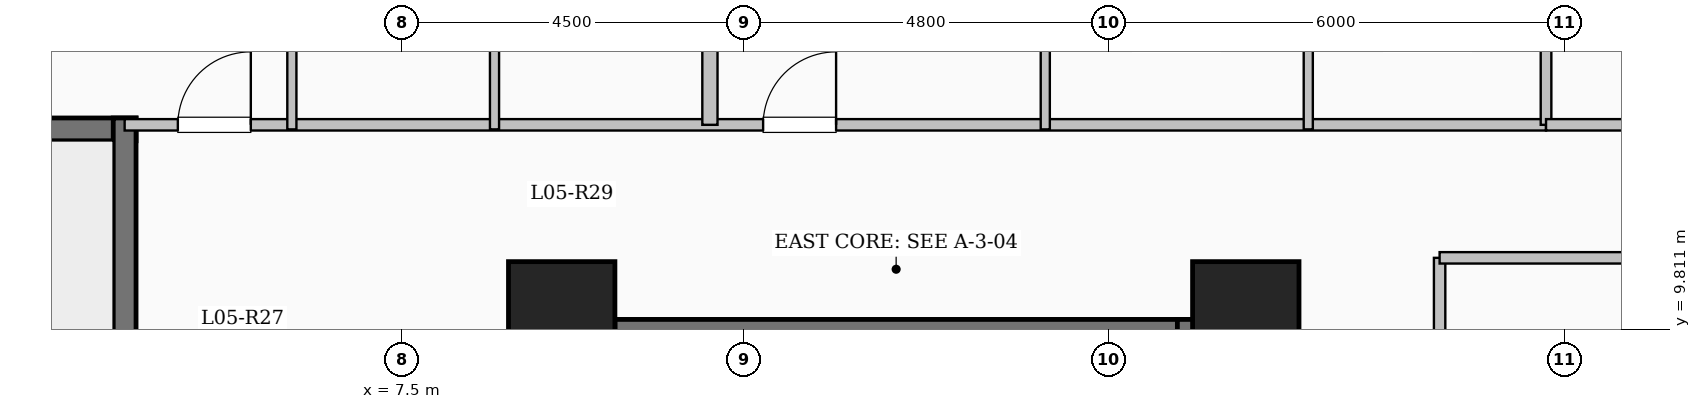
"""IFC4 building model, lengths in metres.
Left out: names, types, materials, properties, quantities, classifications, styles, units other than length and angle.
Written with IfcOpenShell. Run it as: python <this file> out.ifc"""

import sys

from ifc_helpers import new_model, si_unit, direction, frame, frame_2d, origin, origin_2d, place, context, subcontext, project, spatial, rectangle, extrude, element, fill, save


model = new_model("IFC4")
c1 = context("Model", 3, precision=1e-05, world=origin(), true_north=direction((0.0, 1.0)))
c2 = subcontext(c1, "Body", "Model", "MODEL_VIEW")
j1 = project(units=[si_unit("LENGTHUNIT", "METRE"), si_unit("PLANEANGLEUNIT", "RADIAN")], contexts=[c1])
p1 = place(None, origin())
s1 = spatial("IfcSite", under=j1, at=p1, CompositionType="ELEMENT")
p2 = place(p1, origin())
s2 = spatial("IfcBuilding", under=s1, at=p2, CompositionType="ELEMENT")
p3 = place(p2, frame((0.0, 0.0, 24.0)))
s3 = spatial("IfcBuildingStorey", under=s2, at=p3, CompositionType="ELEMENT", Elevation=24.0)
for number, where, z_axis, x_axis in (
    (1, (9.6, 10.0, 0.0), (0.0, 0.0, 1.0), (1.0, 0.0, 0.0)),
    (2, (18.6, 10.0, 0.0), (0.0, 0.0, 1.0), (1.0, 0.0, 0.0)),
):
    element("IfcColumn", number, at=place(p3, frame(where, z_axis=z_axis, x_axis=x_axis)), inside=s3, PredefinedType="COLUMN", context=c2, shape_type="SweptSolid", body=[
        extrude(rectangle(XDim=1.4, YDim=1.4, at=origin_2d()), origin(), (0.0, 0.0, 1.0), 3.35),
    ])
p4 = place(p3, frame((10.0, 9.79, 0.0), z_axis=(0.0, 0.0, 1.0), x_axis=(1.0, 0.0, 0.0)))
e3 = element("IfcWall", 3, at=p4, inside=s3, PredefinedType="SHEAR", context=c2, shape_type="SweptSolid", body=[
    extrude(rectangle(XDim=8.0, YDim=0.3, at=frame_2d((4.0, 0.0))), origin(), (0.0, 0.0, 1.0), 3.35),
])
for number, where, z_axis, x_axis in (
    (4, (10.15, 6.35, 0.0), (0.0, 0.0, 1.0), (0.0, 1.0, 0.0)),
    (5, (17.85, 6.35, 0.0), (0.0, 0.0, 1.0), (0.0, 1.0, 0.0)),
):
    element("IfcWall", number, at=place(p3, frame(where, z_axis=z_axis, x_axis=x_axis)), inside=s3, PredefinedType="SHEAR", context=c2, shape_type="SweptSolid", body=[
        extrude(rectangle(XDim=3.59, YDim=0.3, at=frame_2d((1.795, 0.0))), origin(), (0.0, 0.0, 1.0), 3.35),
    ])
p5 = place(p3, frame((-4.0, 12.44, 0.0), z_axis=(0.0, 0.0, 1.0), x_axis=(1.0, 0.0, 0.0)))
e6 = element("IfcWall", 6, at=p5, inside=s3, PredefinedType="SHEAR", context=c2, shape_type="SweptSolid", body=[
    extrude(rectangle(XDim=8.0, YDim=0.3, at=frame_2d((4.0, 0.0))), origin(), (0.0, 0.0, 1.0), 3.35),
])
p6 = place(p3, frame((3.85, 9.0, 0.0), z_axis=(0.0, 0.0, 1.0), x_axis=(0.0, 1.0, 0.0)))
e7 = element("IfcWall", 7, at=p6, inside=s3, PredefinedType="SHEAR", context=c2, shape_type="SweptSolid", body=[
    extrude(rectangle(XDim=3.59, YDim=0.3, at=frame_2d((1.795, 0.0))), origin(), (0.0, 0.0, 1.0), 3.35),
])
p7 = place(p3, frame((3.85, 12.5, 0.0), z_axis=(0.0, 0.0, 1.0), x_axis=(1.0, 0.0, 0.0)))
e8 = element("IfcWall", 8, at=p7, inside=s3, PredefinedType="PARTITIONING", context=c2, shape_type="SweptSolid", body=[
    extrude(rectangle(XDim=18.7, YDim=0.15, at=frame_2d((9.35, 0.0))), origin(), (0.0, 0.0, 1.0), 3.1),
])
p8 = place(p7, frame((0.7, 0.0, 0.0)))
e9 = element("IfcOpeningElement", 9, at=p8, cuts=e8, PredefinedType="OPENING", context=c2, shape_type="SweptSolid", body=[
    extrude(rectangle(XDim=0.96, YDim=2.15, at=frame_2d((0.48, 1.075))), frame((0.0, 0.085, 0.0), z_axis=(0.0, -1.0, 0.0), x_axis=(1.0, 0.0, 0.0)), (0.0, 0.0, 1.0), 0.17),
])
p9 = place(p7, frame((8.4, 0.0, 0.0)))
e10 = element("IfcOpeningElement", 10, at=p9, cuts=e8, PredefinedType="OPENING", context=c2, shape_type="SweptSolid", body=[
    extrude(rectangle(XDim=0.96, YDim=2.15, at=frame_2d((0.48, 1.075))), frame((0.0, 0.085, 0.0), z_axis=(0.0, -1.0, 0.0), x_axis=(1.0, 0.0, 0.0)), (0.0, 0.0, 1.0), 0.17),
])
p10 = place(p3, frame((21.15, -7.25, 0.0), z_axis=(0.0, 0.0, 1.0), x_axis=(0.0, 1.0, 0.0)))
e11 = element("IfcWall", 11, at=p10, inside=s3, PredefinedType="PARTITIONING", context=c2, shape_type="SweptSolid", body=[
    extrude(rectangle(XDim=18.0, YDim=0.15, at=frame_2d((9.0, 0.0))), origin(), (0.0, 0.0, 1.0), 2.585),
])
p11 = place(p3, frame((11.55, 12.5, 0.0), z_axis=(0.0, 0.0, 1.0), x_axis=(0.0, 1.0, 0.0)))
e12 = element("IfcWall", 12, at=p11, inside=s3, PredefinedType="SOLIDWALL", context=c2, shape_type="SweptSolid", body=[
    extrude(rectangle(XDim=11.1, YDim=0.2, at=frame_2d((5.55, 0.0))), origin(), (0.0, 0.0, 1.0), 3.1),
])
p12 = place(p3, frame((6.05, 12.44, 0.0), z_axis=(0.0, 0.0, 1.0), x_axis=(0.0, 1.0, 0.0)))
e13 = element("IfcWall", 13, at=p12, inside=s3, PredefinedType="PARTITIONING", context=c2, shape_type="SweptSolid", body=[
    extrude(rectangle(XDim=12.381, YDim=0.12, at=frame_2d((6.19, 0.0))), origin(), (0.0, 0.0, 1.0), 3.1),
])
p13 = place(p12, frame((3.245, 0.0, 0.0)))
e14 = element("IfcOpeningElement", 14, at=p13, cuts=e13, PredefinedType="OPENING", context=c2, shape_type="SweptSolid", body=[
    extrude(rectangle(XDim=1.08, YDim=2.15, at=frame_2d((0.54, 1.075))), frame((0.0, 0.07, 0.0), z_axis=(0.0, -1.0, 0.0), x_axis=(1.0, 0.0, 0.0)), (0.0, 0.0, 1.0), 0.14),
])
p14 = place(p3, frame((8.716, 12.44, 0.0), z_axis=(0.0, 0.0, 1.0), x_axis=(0.0, 1.0, 0.0)))
e15 = element("IfcWall", 15, at=p14, inside=s3, PredefinedType="PARTITIONING", context=c2, shape_type="SweptSolid", body=[
    extrude(rectangle(XDim=2.96, YDim=0.12, at=frame_2d((1.48, 0.0))), origin(), (0.0, 0.0, 1.0), 3.1),
])
p15 = place(p3, frame((15.962, 12.44, 0.0), z_axis=(0.0, 0.0, 1.0), x_axis=(0.0, 1.0, 0.0)))
e16 = element("IfcWall", 16, at=p15, inside=s3, PredefinedType="PARTITIONING", context=c2, shape_type="SweptSolid", body=[
    extrude(rectangle(XDim=11.16, YDim=0.12, at=frame_2d((5.58, 0.0))), origin(), (0.0, 0.0, 1.0), 3.1),
])
p16 = place(p15, frame((2.735, 0.0, 0.0)))
e17 = element("IfcOpeningElement", 17, at=p16, cuts=e16, PredefinedType="OPENING", context=c2, shape_type="SweptSolid", body=[
    extrude(rectangle(XDim=1.08, YDim=2.15, at=frame_2d((0.54, 1.075))), frame((0.0, 0.07, 0.0), z_axis=(0.0, -1.0, 0.0), x_axis=(1.0, 0.0, 0.0)), (0.0, 0.0, 1.0), 0.14),
])
p17 = place(p3, frame((19.422, 12.44, 0.0), z_axis=(0.0, 0.0, 1.0), x_axis=(0.0, 1.0, 0.0)))
e18 = element("IfcWall", 18, at=p17, inside=s3, PredefinedType="PARTITIONING", context=c2, shape_type="SweptSolid", body=[
    extrude(rectangle(XDim=2.45, YDim=0.12, at=frame_2d((1.225, 0.0))), origin(), (0.0, 0.0, 1.0), 3.1),
])
p18 = place(p3, frame((21.15, 10.75, 0.0), z_axis=(0.0, 0.0, 1.0), x_axis=(1.0, 0.0, 0.0)))
e19 = element("IfcWall", 19, at=p18, inside=s3, PredefinedType="PARTITIONING", context=c2, shape_type="SweptSolid", body=[
    extrude(rectangle(XDim=7.53, YDim=0.15, at=frame_2d((3.765, 0.0))), origin(), (0.0, 0.0, 1.0), 3.1),
])
p19 = place(p3, frame((22.55, 12.5, 0.0), z_axis=(0.0, 0.0, 1.0), x_axis=(0.0, 1.0, 0.0)))
e20 = element("IfcWall", 20, at=p19, inside=s3, PredefinedType="PARTITIONING", context=c2, shape_type="SweptSolid", body=[
    extrude(rectangle(XDim=6.55, YDim=0.14, at=frame_2d((3.275, 0.0))), origin(), (0.0, 0.0, 1.0), 3.1),
])
p20 = place(p3, frame((22.55, 12.5, 0.0), z_axis=(0.0, 0.0, 1.0), x_axis=(1.0, 0.0, 0.0)))
e21 = element("IfcWall", 21, at=p20, inside=s3, PredefinedType="PARTITIONING", context=c2, shape_type="SweptSolid", body=[
    extrude(rectangle(XDim=6.13, YDim=0.15, at=frame_2d((3.065, 0.0))), origin(), (0.0, 0.0, 1.0), 3.1),
])
p21 = place(p20, frame((2.59, 0.0, 0.0)))
e22 = element("IfcOpeningElement", 22, at=p21, cuts=e21, PredefinedType="OPENING", context=c2, shape_type="SweptSolid", body=[
    extrude(rectangle(XDim=0.95, YDim=2.15, at=frame_2d((0.475, 1.075))), frame((0.0, 0.085, 0.0), z_axis=(0.0, -1.0, 0.0), x_axis=(1.0, 0.0, 0.0)), (0.0, 0.0, 1.0), 0.17),
])
p22 = place(p8, origin())
e23 = element("IfcDoor", 23, at=p22, inside=s3, OperationType="SINGLE_SWING_RIGHT", PredefinedType="DOOR", context=c2, shape_type="SweptSolid", body=[
    extrude(rectangle(XDim=0.96, YDim=2.15, at=frame_2d((0.48, 1.075))), frame((0.0, 0.025, 0.0), z_axis=(0.0, -1.0, 0.0), x_axis=(1.0, 0.0, 0.0)), (0.0, 0.0, 1.0), 0.05),
])
fill(e9, e23)
p23 = place(p9, origin())
e24 = element("IfcDoor", 24, at=p23, inside=s3, OperationType="SINGLE_SWING_RIGHT", PredefinedType="DOOR", context=c2, shape_type="SweptSolid", body=[
    extrude(rectangle(XDim=0.96, YDim=2.15, at=frame_2d((0.48, 1.075))), frame((0.0, 0.025, 0.0), z_axis=(0.0, -1.0, 0.0), x_axis=(1.0, 0.0, 0.0)), (0.0, 0.0, 1.0), 0.05),
])
fill(e10, e24)
save(model, sys.argv[1])
